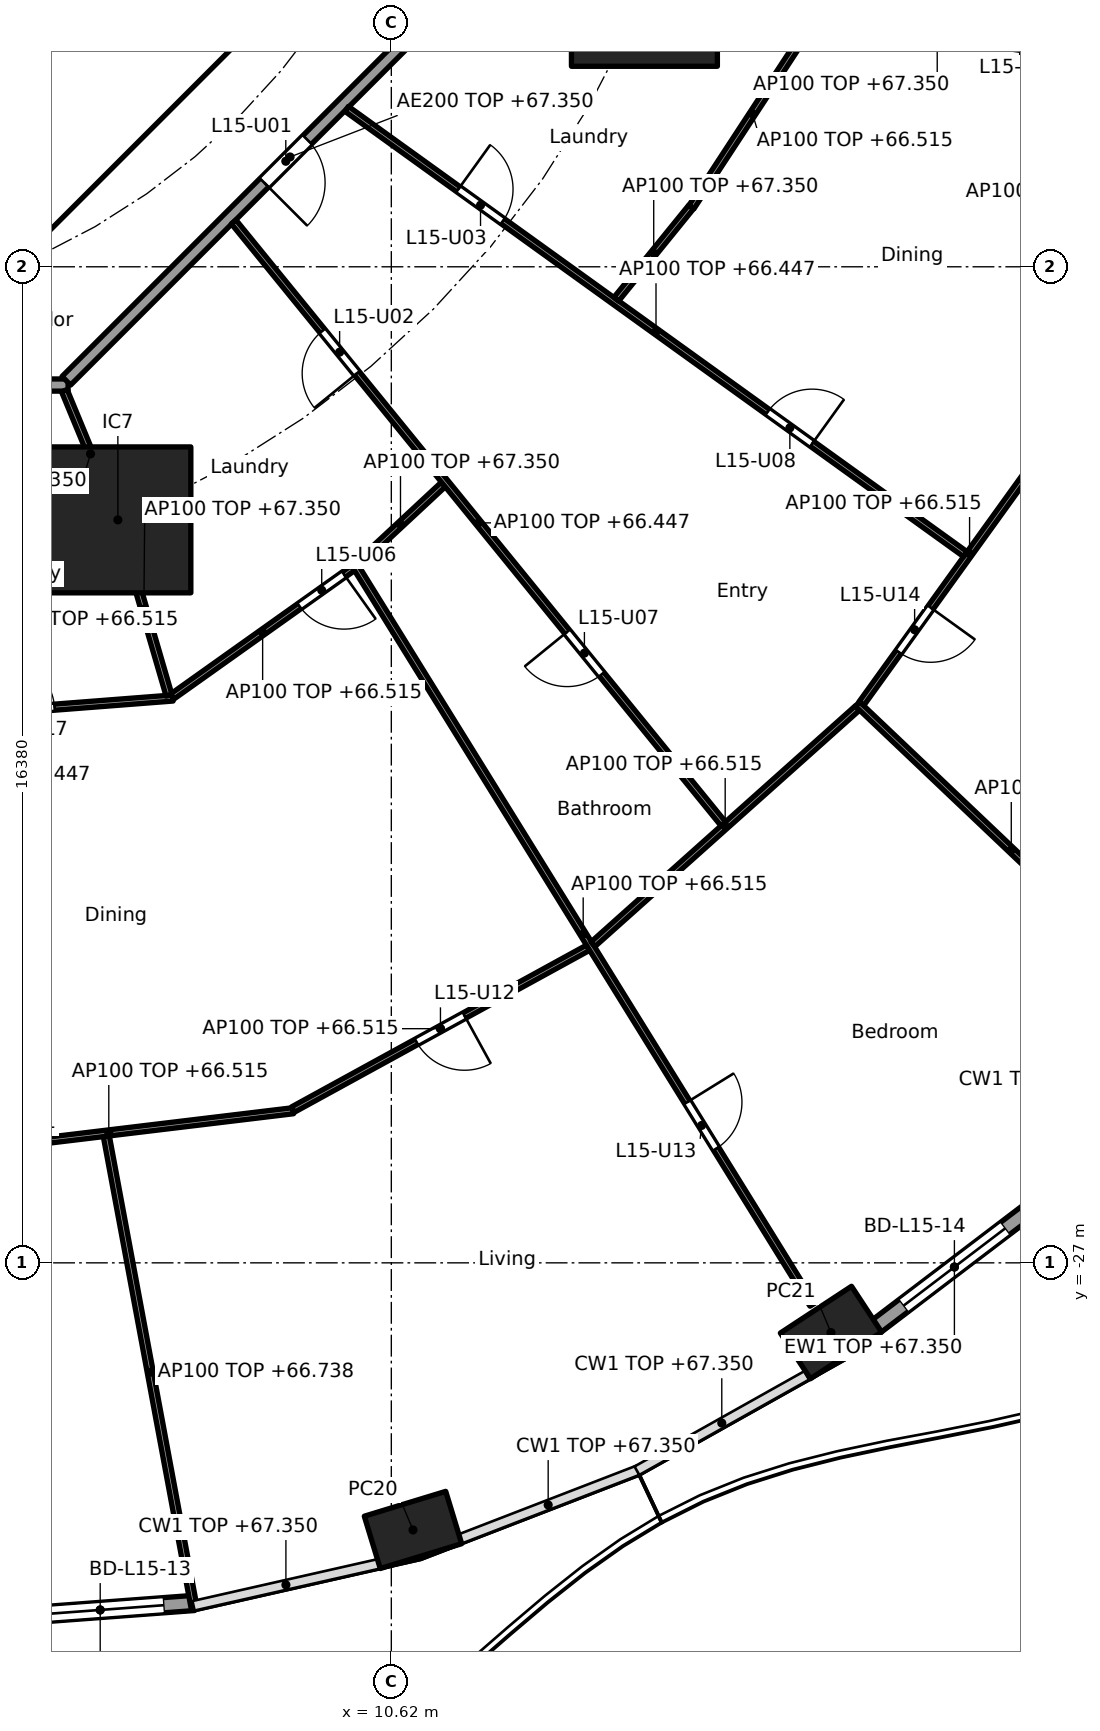
"""IFC4 building model, lengths in metres.
Left out: names, types, materials, properties, quantities, classifications, styles, units other than length and angle.
Written with IfcOpenShell. Run it as: python <this file> out.ifc"""

import sys

from ifc_helpers import new_model, si_unit, direction, frame, frame_2d, origin, origin_2d, place, context, subcontext, project, spatial, rectangle, hollow_rectangle, extrude, element, fill, save


model = new_model("IFC4")
c1 = context("Model", 3, precision=1e-05, world=origin(), true_north=direction((0.0, 1.0)))
c2 = subcontext(c1, "Body", "Model", "MODEL_VIEW")
j1 = project(units=[si_unit("LENGTHUNIT", "METRE"), si_unit("PLANEANGLEUNIT", "RADIAN")], contexts=[c1])
p1 = place(None, origin())
s1 = spatial("IfcSite", under=j1, at=p1, CompositionType="ELEMENT")
p2 = place(p1, origin())
s2 = spatial("IfcBuilding", under=s1, at=p2, CompositionType="ELEMENT")
p3 = place(p2, frame((0.0, 0.0, 64.0)))
s3 = spatial("IfcBuildingStorey", under=s2, at=p3, CompositionType="ELEMENT", Elevation=64.0)
for number, where, z_axis, x_axis in (
    (1, (10.976, -31.393, 0.0), (0.0, 0.0, 1.0), (0.957, 0.292, 0.0)),
    (2, (17.85, -28.146, 0.0), (0.0, 0.0, 1.0), (0.836, 0.549, 0.0)),
):
    element("IfcColumn", number, at=place(p3, frame(where, z_axis=z_axis, x_axis=x_axis)), inside=s3, PredefinedType="COLUMN", context=c2, shape_type="SweptSolid", body=[
        extrude(hollow_rectangle(XDim=1.4, YDim=0.9, WallThickness=0.05, at=origin_2d()), origin(), (0.0, 0.0, 1.0), 3.7),
    ])
for number, where, z_axis, x_axis in (
    (3, (6.123, -14.782, 0.0), (0.0, 0.0, 1.0), (1.0, 0.0, 0.0)),
    (4, (14.782, -6.123, 0.0), (0.0, 0.0, 1.0), (1.0, 0.0, 0.0)),
):
    element("IfcColumn", number, at=place(p3, frame(where, z_axis=z_axis, x_axis=x_axis)), inside=s3, PredefinedType="COLUMN", context=c2, shape_type="SweptSolid", body=[
        extrude(rectangle(XDim=2.4, YDim=2.4, at=origin_2d()), origin(), (0.0, 0.0, 1.0), 3.7),
    ])
p4 = place(p3, frame((7.376, -32.593, 0.0), z_axis=(0.0, 0.0, 1.0), x_axis=(-0.997230834878, -0.074368420505, 0.0)))
e5 = element("IfcWall", 5, at=p4, inside=s3, PredefinedType="SOLIDWALL", context=c2, shape_type="SweptSolid", body=[
    extrude(rectangle(XDim=3.096, YDim=0.25, at=frame_2d((1.548, 0.0))), origin(), (0.0, 0.0, 1.0), 3.35),
])
p5 = place(p4, frame((0.498, 0.0, 0.0)))
e6 = element("IfcOpeningElement", 6, at=p5, cuts=e5, PredefinedType="OPENING", context=c2, shape_type="SweptSolid", body=[
    extrude(rectangle(XDim=2.1, YDim=2.4, at=frame_2d((1.05, 1.2))), frame((0.0, 0.135, 0.0), z_axis=(0.0, -1.0, 0.0), x_axis=(1.0, 0.0, 0.0)), (0.0, 0.0, 1.0), 0.27),
])
p6 = place(p3, frame((21.178, -26.081, 0.0), z_axis=(0.0, 0.0, 1.0), x_axis=(-0.796022293214, -0.605267303517, 0.0)))
e7 = element("IfcWall", 7, at=p6, inside=s3, PredefinedType="SOLIDWALL", context=c2, shape_type="SweptSolid", body=[
    extrude(rectangle(XDim=3.262, YDim=0.25, at=frame_2d((1.631, 0.0))), origin(), (0.0, 0.0, 1.0), 3.35),
])
p7 = place(p6, frame((0.581, 0.0, 0.0)))
e8 = element("IfcOpeningElement", 8, at=p7, cuts=e7, PredefinedType="OPENING", context=c2, shape_type="SweptSolid", body=[
    extrude(rectangle(XDim=2.1, YDim=2.4, at=frame_2d((1.05, 1.2))), frame((0.0, 0.135, 0.0), z_axis=(0.0, -1.0, 0.0), x_axis=(1.0, 0.0, 0.0)), (0.0, 0.0, 1.0), 0.27),
])
p8 = place(p3, frame((4.613, -9.988, 0.0), z_axis=(0.0, 0.0, 1.0), x_axis=(0.707106781187, 0.707106781187, 0.0)))
e9 = element("IfcWall", 9, at=p8, inside=s3, PredefinedType="SHEAR", context=c2, shape_type="SweptSolid", body=[
    extrude(rectangle(XDim=7.602, YDim=0.6, at=frame_2d((3.801, 0.0))), origin(), (0.0, 0.0, 1.0), 3.35),
])
p9 = place(p8, frame((3.201, 0.0, 0.0)))
e10 = element("IfcOpeningElement", 10, at=p9, cuts=e9, PredefinedType="OPENING", context=c2, shape_type="SweptSolid", body=[
    extrude(rectangle(XDim=1.2, YDim=2.1, at=frame_2d((0.6, 1.05))), frame((0.0, 0.31, 0.0), z_axis=(0.0, -1.0, 0.0), x_axis=(1.0, 0.0, 0.0)), (0.0, 0.0, 1.0), 0.62),
])
p10 = place(p3, frame((-5.104, -12.565, 0.0), z_axis=(0.0, 0.0, 1.0), x_axis=(1.0, 0.0, 0.0)))
e11 = element("IfcWall", 11, at=p10, inside=s3, PredefinedType="PARTITIONING", context=c2, shape_type="SweptSolid", body=[
    extrude(rectangle(XDim=10.409, YDim=0.2, at=frame_2d((5.205, 0.0))), origin(), (0.0, 0.0, 1.0), 3.35),
])
p11 = place(p3, frame((5.275, -12.494, 0.0), z_axis=(0.0, 0.0, 1.0), x_axis=(0.707106781187, 0.707106781187, 0.0)))
e12 = element("IfcWall", 12, at=p11, inside=s3, PredefinedType="PARTITIONING", context=c2, shape_type="SweptSolid", body=[
    extrude(rectangle(XDim=10.409, YDim=0.2, at=frame_2d((5.205, 0.0))), origin(), (0.0, 0.0, 1.0), 3.35),
])
p12 = place(p11, frame((4.604, 0.0, 0.0)))
e13 = element("IfcOpeningElement", 13, at=p12, cuts=e12, PredefinedType="OPENING", context=c2, shape_type="SweptSolid", body=[
    extrude(rectangle(XDim=1.0, YDim=2.1, at=frame_2d((0.5, 1.05))), frame((0.0, 0.11, 0.0), z_axis=(0.0, -1.0, 0.0), x_axis=(1.0, 0.0, 0.0)), (0.0, 0.0, 1.0), 0.22),
])
p13 = place(p3, frame((2.288, -18.078, 0.0), z_axis=(0.0, 0.0, 1.0), x_axis=(0.997016297228, 0.077191340583, 0.0)))
e14 = element("IfcWall", 14, at=p13, inside=s3, PredefinedType="PARTITIONING", context=c2, shape_type="SweptSolid", body=[
    extrude(rectangle(XDim=4.754, YDim=0.1, at=frame_2d((2.377, 0.0))), origin(), (0.0, 0.0, 1.0), 2.515),
])
p14 = place(p13, frame((1.902, 0.0, 0.0)))
e15 = element("IfcOpeningElement", 15, at=p14, cuts=e14, PredefinedType="OPENING", context=c2, shape_type="SweptSolid", body=[
    extrude(rectangle(XDim=0.9, YDim=2.1, at=frame_2d((0.45, 1.05))), frame((0.0, 0.06, 0.0), z_axis=(0.0, -1.0, 0.0), x_axis=(1.0, 0.0, 0.0)), (0.0, 0.0, 1.0), 0.12),
])
p15 = place(p3, frame((2.941, -25.229, 0.0), z_axis=(0.0, 0.0, 1.0), x_axis=(0.992836126149, 0.119484001497, 0.0)))
e16 = element("IfcWall", 16, at=p15, inside=s3, PredefinedType="PARTITIONING", context=c2, shape_type="SweptSolid", body=[
    extrude(rectangle(XDim=6.109, YDim=0.1, at=frame_2d((3.055, 0.0))), origin(), (0.0, 0.0, 1.0), 2.515),
])
p16 = place(p15, frame((1.052, 0.0, 0.0)))
e17 = element("IfcOpeningElement", 17, at=p16, cuts=e16, PredefinedType="OPENING", context=c2, shape_type="SweptSolid", body=[
    extrude(rectangle(XDim=0.9, YDim=2.1, at=frame_2d((0.45, 1.05))), frame((0.0, 0.06, 0.0), z_axis=(0.0, -1.0, 0.0), x_axis=(1.0, 0.0, 0.0)), (0.0, 0.0, 1.0), 0.12),
])
p17 = place(p3, frame((5.933, -24.919, 0.0), z_axis=(0.0, 0.0, 1.0), x_axis=(0.183018461258, -0.983109476528, 0.0)))
e18 = element("IfcWall", 18, at=p17, inside=s3, PredefinedType="PARTITIONING", context=c2, shape_type="SweptSolid", body=[
    extrude(rectangle(XDim=7.893, YDim=0.1, at=frame_2d((3.947, 0.0))), origin(), (0.0, 0.0, 1.0), 2.738),
])
p18 = place(p3, frame((5.243, -12.657, 0.0), z_axis=(0.0, 0.0, 1.0), x_axis=(0.382719158442, -0.923864733477, 0.0)))
e19 = element("IfcWall", 19, at=p18, inside=s3, PredefinedType="PARTITIONING", context=c2, shape_type="SweptSolid", body=[
    extrude(rectangle(XDim=2.25, YDim=0.1, at=frame_2d((1.125, 0.0))), origin(), (0.0, 0.0, 1.0), 3.35),
])
p19 = place(p3, frame((6.137, -14.83, 0.0), z_axis=(0.0, 0.0, 1.0), x_axis=(0.279888967793, -0.960032377427, 0.0)))
e20 = element("IfcWall", 20, at=p19, inside=s3, PredefinedType="PARTITIONING", context=c2, shape_type="SweptSolid", body=[
    extrude(rectangle(XDim=2.955, YDim=0.1, at=frame_2d((1.478, 0.0))), origin(), (0.0, 0.0, 1.0), 3.35),
])
p20 = place(p3, frame((7.019, -17.686, 0.0), z_axis=(0.0, 0.0, 1.0), x_axis=(0.81494477814, 0.57953861699, 0.0)))
e21 = element("IfcWall", 21, at=p20, inside=s3, PredefinedType="PARTITIONING", context=c2, shape_type="SweptSolid", body=[
    extrude(rectangle(XDim=3.644, YDim=0.1, at=frame_2d((1.822, 0.0))), origin(), (0.0, 0.0, 1.0), 2.515),
])
p21 = place(p20, frame((2.564, 0.0, 0.0)))
e22 = element("IfcOpeningElement", 22, at=p21, cuts=e21, PredefinedType="OPENING", context=c2, shape_type="SweptSolid", body=[
    extrude(rectangle(XDim=0.9, YDim=2.1, at=frame_2d((0.45, 1.05))), frame((0.0, 0.06, 0.0), z_axis=(0.0, -1.0, 0.0), x_axis=(1.0, 0.0, 0.0)), (0.0, 0.0, 1.0), 0.12),
])
p22 = place(p3, frame((9.001, -24.48, 0.0), z_axis=(0.0, 0.0, 1.0), x_axis=(0.876794415294, 0.480865421203, 0.0)))
e23 = element("IfcWall", 23, at=p22, inside=s3, PredefinedType="PARTITIONING", context=c2, shape_type="SweptSolid", body=[
    extrude(rectangle(XDim=5.536, YDim=0.1, at=frame_2d((2.768, 0.0))), origin(), (0.0, 0.0, 1.0), 2.515),
])
p23 = place(p22, frame((2.318, 0.0, 0.0)))
e24 = element("IfcOpeningElement", 24, at=p23, cuts=e23, PredefinedType="OPENING", context=c2, shape_type="SweptSolid", body=[
    extrude(rectangle(XDim=0.9, YDim=2.1, at=frame_2d((0.45, 1.05))), frame((0.0, 0.06, 0.0), z_axis=(0.0, -1.0, 0.0), x_axis=(1.0, 0.0, 0.0)), (0.0, 0.0, 1.0), 0.12),
])
p24 = place(p3, frame((10.003, -15.503, 0.0), z_axis=(0.0, 0.0, 1.0), x_axis=(0.526446106164, -0.850208502254, 0.0)))
e25 = element("IfcWall", 25, at=p24, inside=s3, PredefinedType="PARTITIONING", context=c2, shape_type="SweptSolid", body=[
    extrude(rectangle(XDim=14.33, YDim=0.1, at=frame_2d((7.165, 0.0))), origin(), (0.0, 0.0, 1.0), 2.515),
])
p25 = place(p24, frame((10.415, 0.0, 0.0)))
e26 = element("IfcOpeningElement", 26, at=p25, cuts=e25, PredefinedType="OPENING", context=c2, shape_type="SweptSolid", body=[
    extrude(rectangle(XDim=0.9, YDim=2.1, at=frame_2d((0.45, 1.05))), frame((0.0, 0.06, 0.0), z_axis=(0.0, -1.0, 0.0), x_axis=(1.0, 0.0, 0.0)), (0.0, 0.0, 1.0), 0.12),
])
p26 = place(p3, frame((10.066, -15.511, 0.0), z_axis=(0.0, 0.0, 1.0), x_axis=(0.73201609945, 0.681287333029, 0.0)))
e27 = element("IfcWall", 27, at=p26, inside=s3, PredefinedType="PARTITIONING", context=c2, shape_type="SweptSolid", body=[
    extrude(rectangle(XDim=1.925, YDim=0.1, at=frame_2d((0.962, 0.0))), origin(), (0.0, 0.0, 1.0), 3.35),
])
p27 = place(p3, frame((13.936, -21.761, 0.0), z_axis=(0.0, 0.0, 1.0), x_axis=(0.745806142791, 0.666163041136, 0.0)))
e28 = element("IfcWall", 28, at=p27, inside=s3, PredefinedType="PARTITIONING", context=c2, shape_type="SweptSolid", body=[
    extrude(rectangle(XDim=5.831, YDim=0.1, at=frame_2d((2.915, 0.0))), origin(), (0.0, 0.0, 1.0), 2.515),
])
p28 = place(p3, frame((8.028, -9.882, 0.0), z_axis=(0.0, 0.0, 1.0), x_axis=(0.631035554955, -0.77575390968, 0.0)))
e29 = element("IfcWall", 29, at=p28, inside=s3, PredefinedType="PARTITIONING", context=c2, shape_type="SweptSolid", body=[
    extrude(rectangle(XDim=12.759, YDim=0.1, at=frame_2d((6.379, 0.0))), origin(), (0.0, 0.0, 1.0), 2.447),
])
p29 = place(p28, frame((2.311, 0.0, 0.0)))
e30 = element("IfcOpeningElement", 30, at=p29, cuts=e29, PredefinedType="OPENING", context=c2, shape_type="SweptSolid", body=[
    extrude(rectangle(XDim=0.9, YDim=2.1, at=frame_2d((0.45, 1.05))), frame((0.0, 0.06, 0.0), z_axis=(0.0, -1.0, 0.0), x_axis=(1.0, 0.0, 0.0)), (0.0, 0.0, 1.0), 0.12),
])
p30 = place(p28, frame((8.69, 0.0, 0.0)))
e31 = element("IfcOpeningElement", 31, at=p30, cuts=e29, PredefinedType="OPENING", context=c2, shape_type="SweptSolid", body=[
    extrude(rectangle(XDim=0.9, YDim=2.1, at=frame_2d((0.45, 1.05))), frame((0.0, 0.06, 0.0), z_axis=(0.0, -1.0, 0.0), x_axis=(1.0, 0.0, 0.0)), (0.0, 0.0, 1.0), 0.12),
])
p31 = place(p3, frame((18.286, -17.809, 0.0), z_axis=(0.0, 0.0, 1.0), x_axis=(0.725242309581, -0.688493712676, 0.0)))
e32 = element("IfcWall", 32, at=p31, inside=s3, PredefinedType="PARTITIONING", context=c2, shape_type="SweptSolid", body=[
    extrude(rectangle(XDim=6.976, YDim=0.1, at=frame_2d((3.488, 0.0))), origin(), (0.0, 0.0, 1.0), 2.515),
])
p32 = place(p3, frame((18.351, -17.803, 0.0), z_axis=(0.0, 0.0, 1.0), x_axis=(0.584558392935, 0.811351640936, 0.0)))
e33 = element("IfcWall", 33, at=p32, inside=s3, PredefinedType="PARTITIONING", context=c2, shape_type="SweptSolid", body=[
    extrude(rectangle(XDim=6.084, YDim=0.1, at=frame_2d((3.042, 0.0))), origin(), (0.0, 0.0, 1.0), 2.515),
])
p33 = place(p32, frame((1.046, 0.0, 0.0)))
e34 = element("IfcOpeningElement", 34, at=p33, cuts=e33, PredefinedType="OPENING", context=c2, shape_type="SweptSolid", body=[
    extrude(rectangle(XDim=0.9, YDim=2.1, at=frame_2d((0.45, 1.05))), frame((0.0, 0.06, 0.0), z_axis=(0.0, -1.0, 0.0), x_axis=(1.0, 0.0, 0.0)), (0.0, 0.0, 1.0), 0.12),
])
p34 = place(p3, frame((9.886, -8.023, 0.0), z_axis=(0.0, 0.0, 1.0), x_axis=(0.811615973871, -0.58419133078, 0.0)))
e35 = element("IfcWall", 35, at=p34, inside=s3, PredefinedType="PARTITIONING", context=c2, shape_type="SweptSolid", body=[
    extrude(rectangle(XDim=12.535, YDim=0.1, at=frame_2d((6.268, 0.0))), origin(), (0.0, 0.0, 1.0), 2.447),
])
p35 = place(p34, frame((2.262, 0.0, 0.0)))
e36 = element("IfcOpeningElement", 36, at=p35, cuts=e35, PredefinedType="OPENING", context=c2, shape_type="SweptSolid", body=[
    extrude(rectangle(XDim=0.9, YDim=2.1, at=frame_2d((0.45, 1.05))), frame((0.0, 0.06, 0.0), z_axis=(0.0, -1.0, 0.0), x_axis=(1.0, 0.0, 0.0)), (0.0, 0.0, 1.0), 0.12),
])
p36 = place(p34, frame((8.53, 0.0, 0.0)))
e37 = element("IfcOpeningElement", 37, at=p36, cuts=e35, PredefinedType="OPENING", context=c2, shape_type="SweptSolid", body=[
    extrude(rectangle(XDim=0.9, YDim=2.1, at=frame_2d((0.45, 1.05))), frame((0.0, 0.06, 0.0), z_axis=(0.0, -1.0, 0.0), x_axis=(1.0, 0.0, 0.0)), (0.0, 0.0, 1.0), 0.12),
])
p37 = place(p3, frame((14.32, -11.153, 0.0), z_axis=(0.0, 0.0, 1.0), x_axis=(0.63006076661, 0.776545832761, 0.0)))
e38 = element("IfcWall", 38, at=p37, inside=s3, PredefinedType="PARTITIONING", context=c2, shape_type="SweptSolid", body=[
    extrude(rectangle(XDim=1.953, YDim=0.1, at=frame_2d((0.977, 0.0))), origin(), (0.0, 0.0, 1.0), 3.35),
])
p38 = place(p3, frame((15.555, -9.639, 0.0), z_axis=(0.0, 0.0, 1.0), x_axis=(0.547618530423, 0.836728119007, 0.0)))
e39 = element("IfcWall", 39, at=p38, inside=s3, PredefinedType="PARTITIONING", context=c2, shape_type="SweptSolid", body=[
    extrude(rectangle(XDim=3.67, YDim=0.1, at=frame_2d((1.835, 0.0))), origin(), (0.0, 0.0, 1.0), 2.515),
])
p39 = place(p3, frame((14.832, -6.13, 0.0), z_axis=(0.0, 0.0, 1.0), x_axis=(0.989837122016, -0.142205737856, 0.0)))
e40 = element("IfcWall", 40, at=p39, inside=s3, PredefinedType="PARTITIONING", context=c2, shape_type="SweptSolid", body=[
    extrude(rectangle(XDim=9.63, YDim=0.1, at=frame_2d((4.815, 0.0))), origin(), (0.0, 0.0, 1.0), 3.35),
])
p40 = place(p39, frame((1.182, 0.0, 0.0)))
e41 = element("IfcOpeningElement", 41, at=p40, cuts=e40, PredefinedType="OPENING", context=c2, shape_type="SweptSolid", body=[
    extrude(rectangle(XDim=0.9, YDim=2.1, at=frame_2d((0.45, 1.05))), frame((0.0, 0.06, 0.0), z_axis=(0.0, -1.0, 0.0), x_axis=(1.0, 0.0, 0.0)), (0.0, 0.0, 1.0), 0.12),
])
p41 = place(p39, frame((5.734, 0.0, 0.0)))
e42 = element("IfcOpeningElement", 42, at=p41, cuts=e40, PredefinedType="OPENING", context=c2, shape_type="SweptSolid", body=[
    extrude(rectangle(XDim=0.9, YDim=2.1, at=frame_2d((0.45, 1.05))), frame((0.0, 0.06, 0.0), z_axis=(0.0, -1.0, 0.0), x_axis=(1.0, 0.0, 0.0)), (0.0, 0.0, 1.0), 0.12),
])
p42 = place(p5, origin())
e43 = element("IfcDoor", 43, at=p42, inside=s3, OperationType="SLIDING_TO_LEFT", PredefinedType="DOOR", context=c2, shape_type="SweptSolid", body=[
    extrude(rectangle(XDim=2.1, YDim=2.4, at=frame_2d((1.05, 1.2))), frame((0.0, 0.025, 0.0), z_axis=(0.0, -1.0, 0.0), x_axis=(1.0, 0.0, 0.0)), (0.0, 0.0, 1.0), 0.05),
])
fill(e6, e43)
p43 = place(p7, origin())
e44 = element("IfcDoor", 44, at=p43, inside=s3, OperationType="SLIDING_TO_LEFT", PredefinedType="DOOR", context=c2, shape_type="SweptSolid", body=[
    extrude(rectangle(XDim=2.1, YDim=2.4, at=frame_2d((1.05, 1.2))), frame((0.0, 0.025, 0.0), z_axis=(0.0, -1.0, 0.0), x_axis=(1.0, 0.0, 0.0)), (0.0, 0.0, 1.0), 0.05),
])
fill(e8, e44)
p44 = place(p9, origin())
e45 = element("IfcDoor", 45, at=p44, inside=s3, OperationType="SINGLE_SWING_RIGHT", PredefinedType="DOOR", context=c2, shape_type="SweptSolid", body=[
    extrude(rectangle(XDim=1.2, YDim=2.1, at=frame_2d((0.6, 1.05))), frame((0.0, 0.025, 0.0), z_axis=(0.0, -1.0, 0.0), x_axis=(1.0, 0.0, 0.0)), (0.0, 0.0, 1.0), 0.05),
])
fill(e10, e45)
p45 = place(p12, frame((1.0, 0.0, 0.0), x_axis=(-1.0, 0.0, 0.0)))
e46 = element("IfcDoor", 46, at=p45, inside=s3, OperationType="SINGLE_SWING_RIGHT", PredefinedType="DOOR", context=c2, shape_type="SweptSolid", body=[
    extrude(rectangle(XDim=1.0, YDim=2.1, at=frame_2d((0.5, 1.05))), frame((0.0, 0.025, 0.0), z_axis=(0.0, -1.0, 0.0), x_axis=(1.0, 0.0, 0.0)), (0.0, 0.0, 1.0), 0.05),
])
fill(e13, e46)
p46 = place(p29, frame((0.9, 0.0, 0.0), x_axis=(-1.0, 0.0, 0.0)))
e47 = element("IfcDoor", 47, at=p46, inside=s3, OperationType="SINGLE_SWING_LEFT", PredefinedType="DOOR", context=c2, shape_type="SweptSolid", body=[
    extrude(rectangle(XDim=0.9, YDim=2.1, at=frame_2d((0.45, 1.05))), frame((0.0, 0.025, 0.0), z_axis=(0.0, -1.0, 0.0), x_axis=(1.0, 0.0, 0.0)), (0.0, 0.0, 1.0), 0.05),
])
fill(e30, e47)
p47 = place(p35, origin())
e48 = element("IfcDoor", 48, at=p47, inside=s3, OperationType="SINGLE_SWING_LEFT", PredefinedType="DOOR", context=c2, shape_type="SweptSolid", body=[
    extrude(rectangle(XDim=0.9, YDim=2.1, at=frame_2d((0.45, 1.05))), frame((0.0, 0.025, 0.0), z_axis=(0.0, -1.0, 0.0), x_axis=(1.0, 0.0, 0.0)), (0.0, 0.0, 1.0), 0.05),
])
fill(e36, e48)
p48 = place(p21, frame((0.9, 0.0, 0.0), x_axis=(-1.0, 0.0, 0.0)))
e49 = element("IfcDoor", 49, at=p48, inside=s3, OperationType="SINGLE_SWING_LEFT", PredefinedType="DOOR", context=c2, shape_type="SweptSolid", body=[
    extrude(rectangle(XDim=0.9, YDim=2.1, at=frame_2d((0.45, 1.05))), frame((0.0, 0.025, 0.0), z_axis=(0.0, -1.0, 0.0), x_axis=(1.0, 0.0, 0.0)), (0.0, 0.0, 1.0), 0.05),
])
fill(e22, e49)
p49 = place(p30, frame((0.9, 0.0, 0.0), x_axis=(-1.0, 0.0, 0.0)))
e50 = element("IfcDoor", 50, at=p49, inside=s3, OperationType="SINGLE_SWING_RIGHT", PredefinedType="DOOR", context=c2, shape_type="SweptSolid", body=[
    extrude(rectangle(XDim=0.9, YDim=2.1, at=frame_2d((0.45, 1.05))), frame((0.0, 0.025, 0.0), z_axis=(0.0, -1.0, 0.0), x_axis=(1.0, 0.0, 0.0)), (0.0, 0.0, 1.0), 0.05),
])
fill(e31, e50)
p50 = place(p36, origin())
e51 = element("IfcDoor", 51, at=p50, inside=s3, OperationType="SINGLE_SWING_RIGHT", PredefinedType="DOOR", context=c2, shape_type="SweptSolid", body=[
    extrude(rectangle(XDim=0.9, YDim=2.1, at=frame_2d((0.45, 1.05))), frame((0.0, 0.025, 0.0), z_axis=(0.0, -1.0, 0.0), x_axis=(1.0, 0.0, 0.0)), (0.0, 0.0, 1.0), 0.05),
])
fill(e37, e51)
p51 = place(p41, origin())
e52 = element("IfcDoor", 52, at=p51, inside=s3, OperationType="SINGLE_SWING_LEFT", PredefinedType="DOOR", context=c2, shape_type="SweptSolid", body=[
    extrude(rectangle(XDim=0.9, YDim=2.1, at=frame_2d((0.45, 1.05))), frame((0.0, 0.025, 0.0), z_axis=(0.0, -1.0, 0.0), x_axis=(1.0, 0.0, 0.0)), (0.0, 0.0, 1.0), 0.05),
])
fill(e42, e52)
p52 = place(p23, frame((0.9, 0.0, 0.0), x_axis=(-1.0, 0.0, 0.0)))
e53 = element("IfcDoor", 53, at=p52, inside=s3, OperationType="SINGLE_SWING_LEFT", PredefinedType="DOOR", context=c2, shape_type="SweptSolid", body=[
    extrude(rectangle(XDim=0.9, YDim=2.1, at=frame_2d((0.45, 1.05))), frame((0.0, 0.025, 0.0), z_axis=(0.0, -1.0, 0.0), x_axis=(1.0, 0.0, 0.0)), (0.0, 0.0, 1.0), 0.05),
])
fill(e24, e53)
p53 = place(p25, origin())
e54 = element("IfcDoor", 54, at=p53, inside=s3, OperationType="SINGLE_SWING_LEFT", PredefinedType="DOOR", context=c2, shape_type="SweptSolid", body=[
    extrude(rectangle(XDim=0.9, YDim=2.1, at=frame_2d((0.45, 1.05))), frame((0.0, 0.025, 0.0), z_axis=(0.0, -1.0, 0.0), x_axis=(1.0, 0.0, 0.0)), (0.0, 0.0, 1.0), 0.05),
])
fill(e26, e54)
p54 = place(p33, frame((0.9, 0.0, 0.0), x_axis=(-1.0, 0.0, 0.0)))
e55 = element("IfcDoor", 55, at=p54, inside=s3, OperationType="SINGLE_SWING_LEFT", PredefinedType="DOOR", context=c2, shape_type="SweptSolid", body=[
    extrude(rectangle(XDim=0.9, YDim=2.1, at=frame_2d((0.45, 1.05))), frame((0.0, 0.025, 0.0), z_axis=(0.0, -1.0, 0.0), x_axis=(1.0, 0.0, 0.0)), (0.0, 0.0, 1.0), 0.05),
])
fill(e34, e55)
p55 = place(p14, origin())
e56 = element("IfcDoor", 56, at=p55, inside=s3, OperationType="SINGLE_SWING_LEFT", PredefinedType="DOOR", context=c2, shape_type="SweptSolid", body=[
    extrude(rectangle(XDim=0.9, YDim=2.1, at=frame_2d((0.45, 1.05))), frame((0.0, 0.025, 0.0), z_axis=(0.0, -1.0, 0.0), x_axis=(1.0, 0.0, 0.0)), (0.0, 0.0, 1.0), 0.05),
])
fill(e15, e56)
save(model, sys.argv[1])
